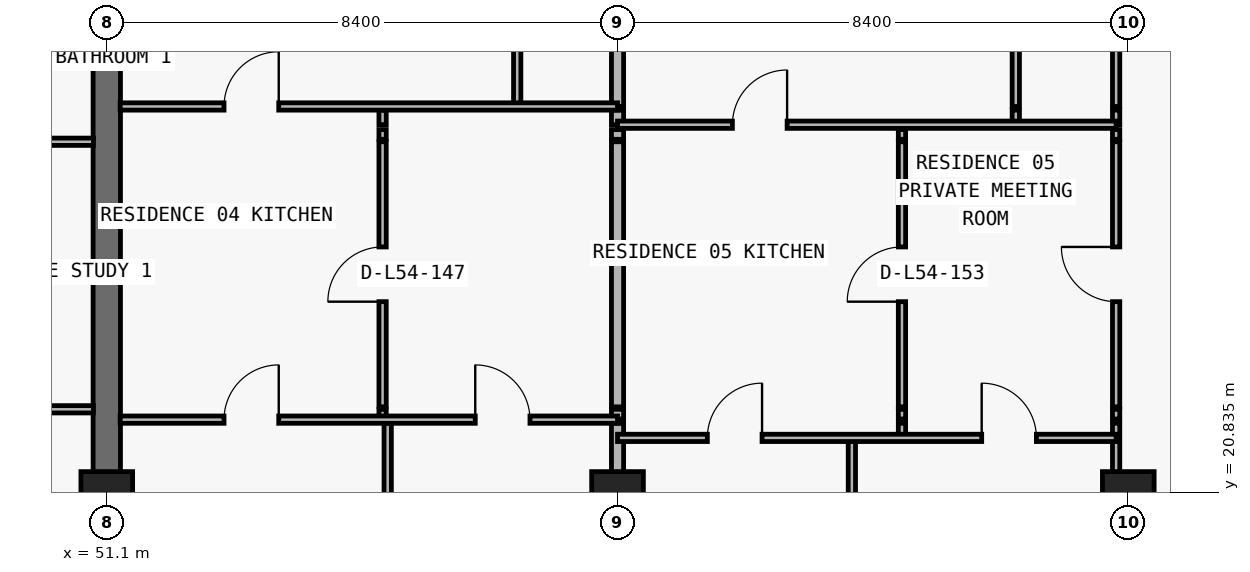
"""IFC4 building model, lengths in metres.
Left out: names, types, materials, properties, quantities, classifications, styles, units other than length and angle.
Written with IfcOpenShell. Run it as: python <this file> out.ifc"""

import sys

from ifc_helpers import new_model, si_unit, direction, frame, frame_2d, origin, origin_2d, place, context, subcontext, project, spatial, rectangle, extrude, element, fill, save


model = new_model("IFC4")
c1 = context("Model", 3, precision=1e-05, world=origin(), true_north=direction((0.0, 1.0)))
c2 = subcontext(c1, "Body", "Model", "MODEL_VIEW")
j1 = project(units=[si_unit("LENGTHUNIT", "METRE"), si_unit("PLANEANGLEUNIT", "RADIAN")], contexts=[c1])
p1 = place(None, origin())
s1 = spatial("IfcSite", under=j1, at=p1, CompositionType="ELEMENT")
p2 = place(p1, origin())
s2 = spatial("IfcBuilding", under=s1, at=p2, CompositionType="ELEMENT")
p3 = place(p2, frame((0.0, 0.0, 195.0)))
s3 = spatial("IfcBuildingStorey", under=s2, at=p3, CompositionType="ELEMENT", Elevation=195.0)
for number, where, z_axis, x_axis in (
    (1, (51.1, 20.8, 0.0), (0.0, 0.0, 1.0), (1.0, 0.0, 0.0)),
    (2, (59.5, 20.8, 0.0), (0.0, 0.0, 1.0), (1.0, 0.0, 0.0)),
    (3, (67.9, 20.8, 0.0), (0.0, 0.0, 1.0), (1.0, 0.0, 0.0)),
):
    element("IfcColumn", number, at=place(p3, frame(where, z_axis=z_axis, x_axis=x_axis)), inside=s3, PredefinedType="COLUMN", context=c2, shape_type="SweptSolid", body=[
        extrude(rectangle(XDim=0.85, YDim=0.75, at=origin_2d()), origin(), (0.0, 0.0, 1.0), 3.05),
    ])
p4 = place(p3, frame((51.1, 20.8, 0.0), z_axis=(0.0, 0.0, 1.0), x_axis=(0.0, 1.0, 0.0)))
e4 = element("IfcWall", 4, at=p4, inside=s3, PredefinedType="SHEAR", context=c2, shape_type="SweptSolid", body=[
    extrude(rectangle(XDim=8.6, YDim=0.45, at=frame_2d((4.3, 0.0))), origin(), (0.0, 0.0, 1.0), 3.05),
])
p5 = place(p3, frame((55.636, 22.04, 0.0), z_axis=(0.0, 0.0, 1.0), x_axis=(0.0, 1.0, 0.0)))
e5 = element("IfcWall", 5, at=p5, inside=s3, PredefinedType="PARTITIONING", context=c2, shape_type="SweptSolid", body=[
    extrude(rectangle(XDim=0.16, YDim=0.12, at=frame_2d((0.08, 0.0))), origin(), (0.0, 0.0, 1.0), 3.05),
])
p6 = place(p3, frame((55.636, 22.24, 0.0), z_axis=(0.0, 0.0, 1.0), x_axis=(0.0, 1.0, 0.0)))
e6 = element("IfcWall", 6, at=p6, inside=s3, PredefinedType="PARTITIONING", context=c2, shape_type="SweptSolid", body=[
    extrude(rectangle(XDim=4.36, YDim=0.12, at=frame_2d((2.18, 0.0))), origin(), (0.0, 0.0, 1.0), 3.05),
])
p7 = place(p6, frame((1.73, 0.0, 0.0)))
e7 = element("IfcOpeningElement", 7, at=p7, cuts=e6, PredefinedType="OPENING", context=c2, shape_type="SweptSolid", body=[
    extrude(rectangle(XDim=0.9, YDim=2.15, at=frame_2d((0.45, 1.075))), frame((0.0, 0.07, 0.0), z_axis=(0.0, -1.0, 0.0), x_axis=(1.0, 0.0, 0.0)), (0.0, 0.0, 1.0), 0.14),
])
p8 = place(p3, frame((55.636, 26.64, 0.0), z_axis=(0.0, 0.0, 1.0), x_axis=(0.0, 1.0, 0.0)))
e8 = element("IfcWall", 8, at=p8, inside=s3, PredefinedType="PARTITIONING", context=c2, shape_type="SweptSolid", body=[
    extrude(rectangle(XDim=0.16, YDim=0.12, at=frame_2d((0.08, 0.0))), origin(), (0.0, 0.0, 1.0), 3.05),
])
p9 = place(p3, frame((55.636, 26.88, 0.0), z_axis=(0.0, 0.0, 1.0), x_axis=(0.0, 1.0, 0.0)))
e9 = element("IfcWall", 9, at=p9, inside=s3, PredefinedType="PARTITIONING", context=c2, shape_type="SweptSolid", body=[
    extrude(rectangle(XDim=0.24, YDim=0.12, at=frame_2d((0.12, 0.0))), origin(), (0.0, 0.0, 1.0), 3.05),
])
p10 = place(p3, frame((55.72, 11.24, 0.0), z_axis=(0.0, 0.0, 1.0), x_axis=(0.0, 1.0, 0.0)))
e10 = element("IfcWall", 10, at=p10, inside=s3, PredefinedType="PARTITIONING", context=c2, shape_type="SweptSolid", body=[
    extrude(rectangle(XDim=10.73, YDim=0.12, at=frame_2d((5.365, 0.0))), origin(), (0.0, 0.0, 1.0), 3.05),
])
p11 = place(p3, frame((57.85, 27.18, 0.0), z_axis=(0.0, 0.0, 1.0), x_axis=(0.0, 1.0, 0.0)))
e11 = element("IfcWall", 11, at=p11, inside=s3, PredefinedType="PARTITIONING", context=c2, shape_type="SweptSolid", body=[
    extrude(rectangle(XDim=6.32, YDim=0.12, at=frame_2d((3.16, 0.0))), origin(), (0.0, 0.0, 1.0), 3.05),
])
p12 = place(p11, frame((3.035, 0.0, 0.0)))
e12 = element("IfcOpeningElement", 12, at=p12, cuts=e11, PredefinedType="OPENING", context=c2, shape_type="SweptSolid", body=[
    extrude(rectangle(XDim=0.85, YDim=2.1, at=frame_2d((0.425, 1.05))), frame((0.0, 0.07, 0.0), z_axis=(0.0, -1.0, 0.0), x_axis=(1.0, 0.0, 0.0)), (0.0, 0.0, 1.0), 0.14),
])
p13 = place(p3, frame((59.5, 11.24, 0.0), z_axis=(0.0, 0.0, 1.0), x_axis=(0.0, 1.0, 0.0)))
e13 = element("IfcWall", 13, at=p13, inside=s3, PredefinedType="PARTITIONING", context=c2, shape_type="SweptSolid", body=[
    extrude(rectangle(XDim=10.73, YDim=0.2, at=frame_2d((5.365, 0.0))), origin(), (0.0, 0.0, 1.0), 2.263),
])
p14 = place(p3, frame((59.5, 22.04, 0.0), z_axis=(0.0, 0.0, 1.0), x_axis=(0.0, 1.0, 0.0)))
e14 = element("IfcWall", 14, at=p14, inside=s3, PredefinedType="PARTITIONING", context=c2, shape_type="SweptSolid", body=[
    extrude(rectangle(XDim=0.16, YDim=0.2, at=frame_2d((0.08, 0.0))), origin(), (0.0, 0.0, 1.0), 2.263),
])
p15 = place(p3, frame((59.5, 22.24, 0.0), z_axis=(0.0, 0.0, 1.0), x_axis=(0.0, 1.0, 0.0)))
e15 = element("IfcWall", 15, at=p15, inside=s3, PredefinedType="PARTITIONING", context=c2, shape_type="SweptSolid", body=[
    extrude(rectangle(XDim=4.36, YDim=0.2, at=frame_2d((2.18, 0.0))), origin(), (0.0, 0.0, 1.0), 2.263),
])
p16 = place(p3, frame((59.5, 26.64, 0.0), z_axis=(0.0, 0.0, 1.0), x_axis=(0.0, 1.0, 0.0)))
e16 = element("IfcWall", 16, at=p16, inside=s3, PredefinedType="PARTITIONING", context=c2, shape_type="SweptSolid", body=[
    extrude(rectangle(XDim=0.16, YDim=0.2, at=frame_2d((0.08, 0.0))), origin(), (0.0, 0.0, 1.0), 2.263),
])
p17 = place(p3, frame((59.5, 26.88, 0.0), z_axis=(0.0, 0.0, 1.0), x_axis=(0.0, 1.0, 0.0)))
e17 = element("IfcWall", 17, at=p17, inside=s3, PredefinedType="PARTITIONING", context=c2, shape_type="SweptSolid", body=[
    extrude(rectangle(XDim=0.24, YDim=0.2, at=frame_2d((0.12, 0.0))), origin(), (0.0, 0.0, 1.0), 2.263),
])
p18 = place(p3, frame((59.5, 27.18, 0.0), z_axis=(0.0, 0.0, 1.0), x_axis=(0.0, 1.0, 0.0)))
e18 = element("IfcWall", 18, at=p18, inside=s3, PredefinedType="PARTITIONING", context=c2, shape_type="SweptSolid", body=[
    extrude(rectangle(XDim=6.32, YDim=0.2, at=frame_2d((3.16, 0.0))), origin(), (0.0, 0.0, 1.0), 2.263),
])
p19 = place(p3, frame((63.354, 11.24, 0.0), z_axis=(0.0, 0.0, 1.0), x_axis=(0.0, 1.0, 0.0)))
e19 = element("IfcWall", 19, at=p19, inside=s3, PredefinedType="PARTITIONING", context=c2, shape_type="SweptSolid", body=[
    extrude(rectangle(XDim=10.49, YDim=0.12, at=frame_2d((5.245, 0.0))), origin(), (0.0, 0.0, 1.0), 3.05),
])
p20 = place(p3, frame((64.178, 21.73, 0.0), z_axis=(0.0, 0.0, 1.0), x_axis=(0.0, 1.0, 0.0)))
e20 = element("IfcWall", 20, at=p20, inside=s3, PredefinedType="PARTITIONING", context=c2, shape_type="SweptSolid", body=[
    extrude(rectangle(XDim=0.24, YDim=0.12, at=frame_2d((0.12, 0.0))), origin(), (0.0, 0.0, 1.0), 3.05),
])
p21 = place(p3, frame((64.178, 22.04, 0.0), z_axis=(0.0, 0.0, 1.0), x_axis=(0.0, 1.0, 0.0)))
e21 = element("IfcWall", 21, at=p21, inside=s3, PredefinedType="PARTITIONING", context=c2, shape_type="SweptSolid", body=[
    extrude(rectangle(XDim=0.16, YDim=0.12, at=frame_2d((0.08, 0.0))), origin(), (0.0, 0.0, 1.0), 3.05),
])
p22 = place(p3, frame((64.178, 22.24, 0.0), z_axis=(0.0, 0.0, 1.0), x_axis=(0.0, 1.0, 0.0)))
e22 = element("IfcWall", 22, at=p22, inside=s3, PredefinedType="PARTITIONING", context=c2, shape_type="SweptSolid", body=[
    extrude(rectangle(XDim=4.36, YDim=0.12, at=frame_2d((2.18, 0.0))), origin(), (0.0, 0.0, 1.0), 3.05),
])
p23 = place(p22, frame((1.73, 0.0, 0.0)))
e23 = element("IfcOpeningElement", 23, at=p23, cuts=e22, PredefinedType="OPENING", context=c2, shape_type="SweptSolid", body=[
    extrude(rectangle(XDim=0.9, YDim=2.15, at=frame_2d((0.45, 1.075))), frame((0.0, 0.07, 0.0), z_axis=(0.0, -1.0, 0.0), x_axis=(1.0, 0.0, 0.0)), (0.0, 0.0, 1.0), 0.14),
])
p24 = place(p3, frame((64.178, 26.64, 0.0), z_axis=(0.0, 0.0, 1.0), x_axis=(0.0, 1.0, 0.0)))
e24 = element("IfcWall", 24, at=p24, inside=s3, PredefinedType="PARTITIONING", context=c2, shape_type="SweptSolid", body=[
    extrude(rectangle(XDim=0.16, YDim=0.12, at=frame_2d((0.08, 0.0))), origin(), (0.0, 0.0, 1.0), 3.05),
])
p25 = place(p3, frame((66.05, 26.88, 0.0), z_axis=(0.0, 0.0, 1.0), x_axis=(0.0, 1.0, 0.0)))
e25 = element("IfcWall", 25, at=p25, inside=s3, PredefinedType="PARTITIONING", context=c2, shape_type="SweptSolid", body=[
    extrude(rectangle(XDim=0.24, YDim=0.12, at=frame_2d((0.12, 0.0))), origin(), (0.0, 0.0, 1.0), 3.05),
])
p26 = place(p3, frame((66.05, 27.18, 0.0), z_axis=(0.0, 0.0, 1.0), x_axis=(0.0, 1.0, 0.0)))
e26 = element("IfcWall", 26, at=p26, inside=s3, PredefinedType="PARTITIONING", context=c2, shape_type="SweptSolid", body=[
    extrude(rectangle(XDim=6.32, YDim=0.12, at=frame_2d((3.16, 0.0))), origin(), (0.0, 0.0, 1.0), 3.05),
])
p27 = place(p26, frame((3.035, 0.0, 0.0)))
e27 = element("IfcOpeningElement", 27, at=p27, cuts=e26, PredefinedType="OPENING", context=c2, shape_type="SweptSolid", body=[
    extrude(rectangle(XDim=0.85, YDim=2.1, at=frame_2d((0.425, 1.05))), frame((0.0, 0.07, 0.0), z_axis=(0.0, -1.0, 0.0), x_axis=(1.0, 0.0, 0.0)), (0.0, 0.0, 1.0), 0.14),
])
p28 = place(p3, frame((67.7, 11.32, 0.0), z_axis=(0.0, 0.0, 1.0), x_axis=(0.0, 1.0, 0.0)))
e28 = element("IfcWall", 28, at=p28, inside=s3, PredefinedType="PARTITIONING", context=c2, shape_type="SweptSolid", body=[
    extrude(rectangle(XDim=10.65, YDim=0.12, at=frame_2d((5.325, 0.0))), origin(), (0.0, 0.0, 1.0), 2.263),
])
p29 = place(p3, frame((67.7, 22.04, 0.0), z_axis=(0.0, 0.0, 1.0), x_axis=(0.0, 1.0, 0.0)))
e29 = element("IfcWall", 29, at=p29, inside=s3, PredefinedType="PARTITIONING", context=c2, shape_type="SweptSolid", body=[
    extrude(rectangle(XDim=0.16, YDim=0.12, at=frame_2d((0.08, 0.0))), origin(), (0.0, 0.0, 1.0), 2.263),
])
p30 = place(p3, frame((67.7, 22.24, 0.0), z_axis=(0.0, 0.0, 1.0), x_axis=(0.0, 1.0, 0.0)))
e30 = element("IfcWall", 30, at=p30, inside=s3, PredefinedType="PARTITIONING", context=c2, shape_type="SweptSolid", body=[
    extrude(rectangle(XDim=4.36, YDim=0.12, at=frame_2d((2.18, 0.0))), origin(), (0.0, 0.0, 1.0), 2.263),
])
p31 = place(p30, frame((1.73, 0.0, 0.0)))
e31 = element("IfcOpeningElement", 31, at=p31, cuts=e30, PredefinedType="OPENING", context=c2, shape_type="SweptSolid", body=[
    extrude(rectangle(XDim=0.9, YDim=2.15, at=frame_2d((0.45, 1.075))), frame((0.0, 0.07, 0.0), z_axis=(0.0, -1.0, 0.0), x_axis=(1.0, 0.0, 0.0)), (0.0, 0.0, 1.0), 0.14),
])
p32 = place(p3, frame((67.7, 26.64, 0.0), z_axis=(0.0, 0.0, 1.0), x_axis=(0.0, 1.0, 0.0)))
e32 = element("IfcWall", 32, at=p32, inside=s3, PredefinedType="PARTITIONING", context=c2, shape_type="SweptSolid", body=[
    extrude(rectangle(XDim=0.16, YDim=0.12, at=frame_2d((0.08, 0.0))), origin(), (0.0, 0.0, 1.0), 2.263),
])
p33 = place(p3, frame((67.7, 26.88, 0.0), z_axis=(0.0, 0.0, 1.0), x_axis=(0.0, 1.0, 0.0)))
e33 = element("IfcWall", 33, at=p33, inside=s3, PredefinedType="PARTITIONING", context=c2, shape_type="SweptSolid", body=[
    extrude(rectangle(XDim=0.24, YDim=0.12, at=frame_2d((0.12, 0.0))), origin(), (0.0, 0.0, 1.0), 2.263),
])
p34 = place(p3, frame((67.7, 27.18, 0.0), z_axis=(0.0, 0.0, 1.0), x_axis=(0.0, 1.0, 0.0)))
e34 = element("IfcWall", 34, at=p34, inside=s3, PredefinedType="PARTITIONING", context=c2, shape_type="SweptSolid", body=[
    extrude(rectangle(XDim=6.32, YDim=0.12, at=frame_2d((3.16, 0.0))), origin(), (0.0, 0.0, 1.0), 2.263),
])
p35 = place(p3, frame((59.5, 21.73, 0.0), z_axis=(0.0, 0.0, 1.0), x_axis=(1.0, 0.0, 0.0)))
e35 = element("IfcWall", 35, at=p35, inside=s3, PredefinedType="PARTITIONING", context=c2, shape_type="SweptSolid", body=[
    extrude(rectangle(XDim=8.2, YDim=0.12, at=frame_2d((4.1, 0.0))), origin(), (0.0, 0.0, 1.0), 3.05),
])
p36 = place(p35, frame((1.477, 0.0, 0.0)))
e36 = element("IfcOpeningElement", 36, at=p36, cuts=e35, PredefinedType="OPENING", context=c2, shape_type="SweptSolid", body=[
    extrude(rectangle(XDim=0.9, YDim=2.15, at=frame_2d((0.45, 1.075))), frame((0.0, 0.07, 0.0), z_axis=(0.0, -1.0, 0.0), x_axis=(1.0, 0.0, 0.0)), (0.0, 0.0, 1.0), 0.14),
])
p37 = place(p35, frame((5.989, 0.0, 0.0)))
e37 = element("IfcOpeningElement", 37, at=p37, cuts=e35, PredefinedType="OPENING", context=c2, shape_type="SweptSolid", body=[
    extrude(rectangle(XDim=0.9, YDim=2.15, at=frame_2d((0.45, 1.075))), frame((0.0, 0.07, 0.0), z_axis=(0.0, -1.0, 0.0), x_axis=(1.0, 0.0, 0.0)), (0.0, 0.0, 1.0), 0.14),
])
p38 = place(p3, frame((51.32, 22.03, 0.0), z_axis=(0.0, 0.0, 1.0), x_axis=(1.0, 0.0, 0.0)))
e38 = element("IfcWall", 38, at=p38, inside=s3, PredefinedType="PARTITIONING", context=c2, shape_type="SweptSolid", body=[
    extrude(rectangle(XDim=8.18, YDim=0.12, at=frame_2d((4.09, 0.0))), origin(), (0.0, 0.0, 1.0), 3.05),
])
p39 = place(p38, frame((1.708, 0.0, 0.0)))
e39 = element("IfcOpeningElement", 39, at=p39, cuts=e38, PredefinedType="OPENING", context=c2, shape_type="SweptSolid", body=[
    extrude(rectangle(XDim=0.9, YDim=2.15, at=frame_2d((0.45, 1.075))), frame((0.0, 0.07, 0.0), z_axis=(0.0, -1.0, 0.0), x_axis=(1.0, 0.0, 0.0)), (0.0, 0.0, 1.0), 0.14),
])
p40 = place(p38, frame((5.84, 0.0, 0.0)))
e40 = element("IfcOpeningElement", 40, at=p40, cuts=e38, PredefinedType="OPENING", context=c2, shape_type="SweptSolid", body=[
    extrude(rectangle(XDim=0.9, YDim=2.15, at=frame_2d((0.45, 1.075))), frame((0.0, 0.07, 0.0), z_axis=(0.0, -1.0, 0.0), x_axis=(1.0, 0.0, 0.0)), (0.0, 0.0, 1.0), 0.14),
])
p41 = place(p3, frame((42.705, 22.2, 0.0), z_axis=(0.0, 0.0, 1.0), x_axis=(1.0, 0.0, 0.0)))
e41 = element("IfcWall", 41, at=p41, inside=s3, PredefinedType="PARTITIONING", context=c2, shape_type="SweptSolid", body=[
    extrude(rectangle(XDim=8.175, YDim=0.12, at=frame_2d((4.087, 0.0))), origin(), (0.0, 0.0, 1.0), 3.05),
])
p42 = place(p41, frame((3.637, 0.0, 0.0)))
e42 = element("IfcOpeningElement", 42, at=p42, cuts=e41, PredefinedType="OPENING", context=c2, shape_type="SweptSolid", body=[
    extrude(rectangle(XDim=0.9, YDim=2.15, at=frame_2d((0.45, 1.075))), frame((0.0, 0.07, 0.0), z_axis=(0.0, -1.0, 0.0), x_axis=(1.0, 0.0, 0.0)), (0.0, 0.0, 1.0), 0.14),
])
p43 = place(p3, frame((42.7, 26.6, 0.0), z_axis=(0.0, 0.0, 1.0), x_axis=(1.0, 0.0, 0.0)))
e43 = element("IfcWall", 43, at=p43, inside=s3, PredefinedType="PARTITIONING", context=c2, shape_type="SweptSolid", body=[
    extrude(rectangle(XDim=8.18, YDim=0.12, at=frame_2d((4.09, 0.0))), origin(), (0.0, 0.0, 1.0), 3.05),
])
p44 = place(p43, frame((3.0, 0.0, 0.0)))
e44 = element("IfcOpeningElement", 44, at=p44, cuts=e43, PredefinedType="OPENING", context=c2, shape_type="SweptSolid", body=[
    extrude(rectangle(XDim=0.9, YDim=2.15, at=frame_2d((0.45, 1.075))), frame((0.0, 0.07, 0.0), z_axis=(0.0, -1.0, 0.0), x_axis=(1.0, 0.0, 0.0)), (0.0, 0.0, 1.0), 0.14),
])
p45 = place(p3, frame((59.5, 26.88, 0.0), z_axis=(0.0, 0.0, 1.0), x_axis=(1.0, 0.0, 0.0)))
e45 = element("IfcWall", 45, at=p45, inside=s3, PredefinedType="PARTITIONING", context=c2, shape_type="SweptSolid", body=[
    extrude(rectangle(XDim=8.2, YDim=0.12, at=frame_2d((4.1, 0.0))), origin(), (0.0, 0.0, 1.0), 3.05),
])
p46 = place(p45, frame((1.889, 0.0, 0.0)))
e46 = element("IfcOpeningElement", 46, at=p46, cuts=e45, PredefinedType="OPENING", context=c2, shape_type="SweptSolid", body=[
    extrude(rectangle(XDim=0.9, YDim=2.15, at=frame_2d((0.45, 1.075))), frame((0.0, 0.07, 0.0), z_axis=(0.0, -1.0, 0.0), x_axis=(1.0, 0.0, 0.0)), (0.0, 0.0, 1.0), 0.14),
])
p47 = place(p3, frame((51.32, 27.18, 0.0), z_axis=(0.0, 0.0, 1.0), x_axis=(1.0, 0.0, 0.0)))
e47 = element("IfcWall", 47, at=p47, inside=s3, PredefinedType="PARTITIONING", context=c2, shape_type="SweptSolid", body=[
    extrude(rectangle(XDim=8.18, YDim=0.12, at=frame_2d((4.09, 0.0))), origin(), (0.0, 0.0, 1.0), 3.05),
])
p48 = place(p47, frame((1.708, 0.0, 0.0)))
e48 = element("IfcOpeningElement", 48, at=p48, cuts=e47, PredefinedType="OPENING", context=c2, shape_type="SweptSolid", body=[
    extrude(rectangle(XDim=0.9, YDim=2.15, at=frame_2d((0.45, 1.075))), frame((0.0, 0.07, 0.0), z_axis=(0.0, -1.0, 0.0), x_axis=(1.0, 0.0, 0.0)), (0.0, 0.0, 1.0), 0.14),
])
p49 = place(p48, origin())
e49 = element("IfcDoor", 49, at=p49, inside=s3, OperationType="SINGLE_SWING_RIGHT", PredefinedType="DOOR", context=c2, shape_type="SweptSolid", body=[
    extrude(rectangle(XDim=0.9, YDim=2.15, at=frame_2d((0.45, 1.075))), frame((0.0, 0.025, 0.0), z_axis=(0.0, -1.0, 0.0), x_axis=(1.0, 0.0, 0.0)), (0.0, 0.0, 1.0), 0.05),
])
fill(e48, e49)
p50 = place(p7, origin())
e50 = element("IfcDoor", 50, at=p50, inside=s3, OperationType="SINGLE_SWING_LEFT", PredefinedType="DOOR", context=c2, shape_type="SweptSolid", body=[
    extrude(rectangle(XDim=0.9, YDim=2.15, at=frame_2d((0.45, 1.075))), frame((0.0, 0.025, 0.0), z_axis=(0.0, -1.0, 0.0), x_axis=(1.0, 0.0, 0.0)), (0.0, 0.0, 1.0), 0.05),
])
fill(e7, e50)
p51 = place(p39, origin())
e51 = element("IfcDoor", 51, at=p51, inside=s3, OperationType="SINGLE_SWING_RIGHT", PredefinedType="DOOR", context=c2, shape_type="SweptSolid", body=[
    extrude(rectangle(XDim=0.9, YDim=2.15, at=frame_2d((0.45, 1.075))), frame((0.0, 0.025, 0.0), z_axis=(0.0, -1.0, 0.0), x_axis=(1.0, 0.0, 0.0)), (0.0, 0.0, 1.0), 0.05),
])
fill(e39, e51)
p52 = place(p40, origin())
e52 = element("IfcDoor", 52, at=p52, inside=s3, OperationType="SINGLE_SWING_LEFT", PredefinedType="DOOR", context=c2, shape_type="SweptSolid", body=[
    extrude(rectangle(XDim=0.9, YDim=2.15, at=frame_2d((0.45, 1.075))), frame((0.0, 0.025, 0.0), z_axis=(0.0, -1.0, 0.0), x_axis=(1.0, 0.0, 0.0)), (0.0, 0.0, 1.0), 0.05),
])
fill(e40, e52)
p53 = place(p46, origin())
e53 = element("IfcDoor", 53, at=p53, inside=s3, OperationType="SINGLE_SWING_RIGHT", PredefinedType="DOOR", context=c2, shape_type="SweptSolid", body=[
    extrude(rectangle(XDim=0.9, YDim=2.15, at=frame_2d((0.45, 1.075))), frame((0.0, 0.025, 0.0), z_axis=(0.0, -1.0, 0.0), x_axis=(1.0, 0.0, 0.0)), (0.0, 0.0, 1.0), 0.05),
])
fill(e46, e53)
p54 = place(p23, origin())
e54 = element("IfcDoor", 54, at=p54, inside=s3, OperationType="SINGLE_SWING_LEFT", PredefinedType="DOOR", context=c2, shape_type="SweptSolid", body=[
    extrude(rectangle(XDim=0.9, YDim=2.15, at=frame_2d((0.45, 1.075))), frame((0.0, 0.025, 0.0), z_axis=(0.0, -1.0, 0.0), x_axis=(1.0, 0.0, 0.0)), (0.0, 0.0, 1.0), 0.05),
])
fill(e23, e54)
p55 = place(p36, origin())
e55 = element("IfcDoor", 55, at=p55, inside=s3, OperationType="SINGLE_SWING_RIGHT", PredefinedType="DOOR", context=c2, shape_type="SweptSolid", body=[
    extrude(rectangle(XDim=0.9, YDim=2.15, at=frame_2d((0.45, 1.075))), frame((0.0, 0.025, 0.0), z_axis=(0.0, -1.0, 0.0), x_axis=(1.0, 0.0, 0.0)), (0.0, 0.0, 1.0), 0.05),
])
fill(e36, e55)
p56 = place(p37, origin())
e56 = element("IfcDoor", 56, at=p56, inside=s3, OperationType="SINGLE_SWING_LEFT", PredefinedType="DOOR", context=c2, shape_type="SweptSolid", body=[
    extrude(rectangle(XDim=0.9, YDim=2.15, at=frame_2d((0.45, 1.075))), frame((0.0, 0.025, 0.0), z_axis=(0.0, -1.0, 0.0), x_axis=(1.0, 0.0, 0.0)), (0.0, 0.0, 1.0), 0.05),
])
fill(e37, e56)
p57 = place(p31, origin())
e57 = element("IfcDoor", 57, at=p57, inside=s3, OperationType="SINGLE_SWING_RIGHT", PredefinedType="DOOR", context=c2, shape_type="SweptSolid", body=[
    extrude(rectangle(XDim=0.9, YDim=2.15, at=frame_2d((0.45, 1.075))), frame((0.0, 0.025, 0.0), z_axis=(0.0, -1.0, 0.0), x_axis=(1.0, 0.0, 0.0)), (0.0, 0.0, 1.0), 0.05),
])
fill(e31, e57)
save(model, sys.argv[1])
